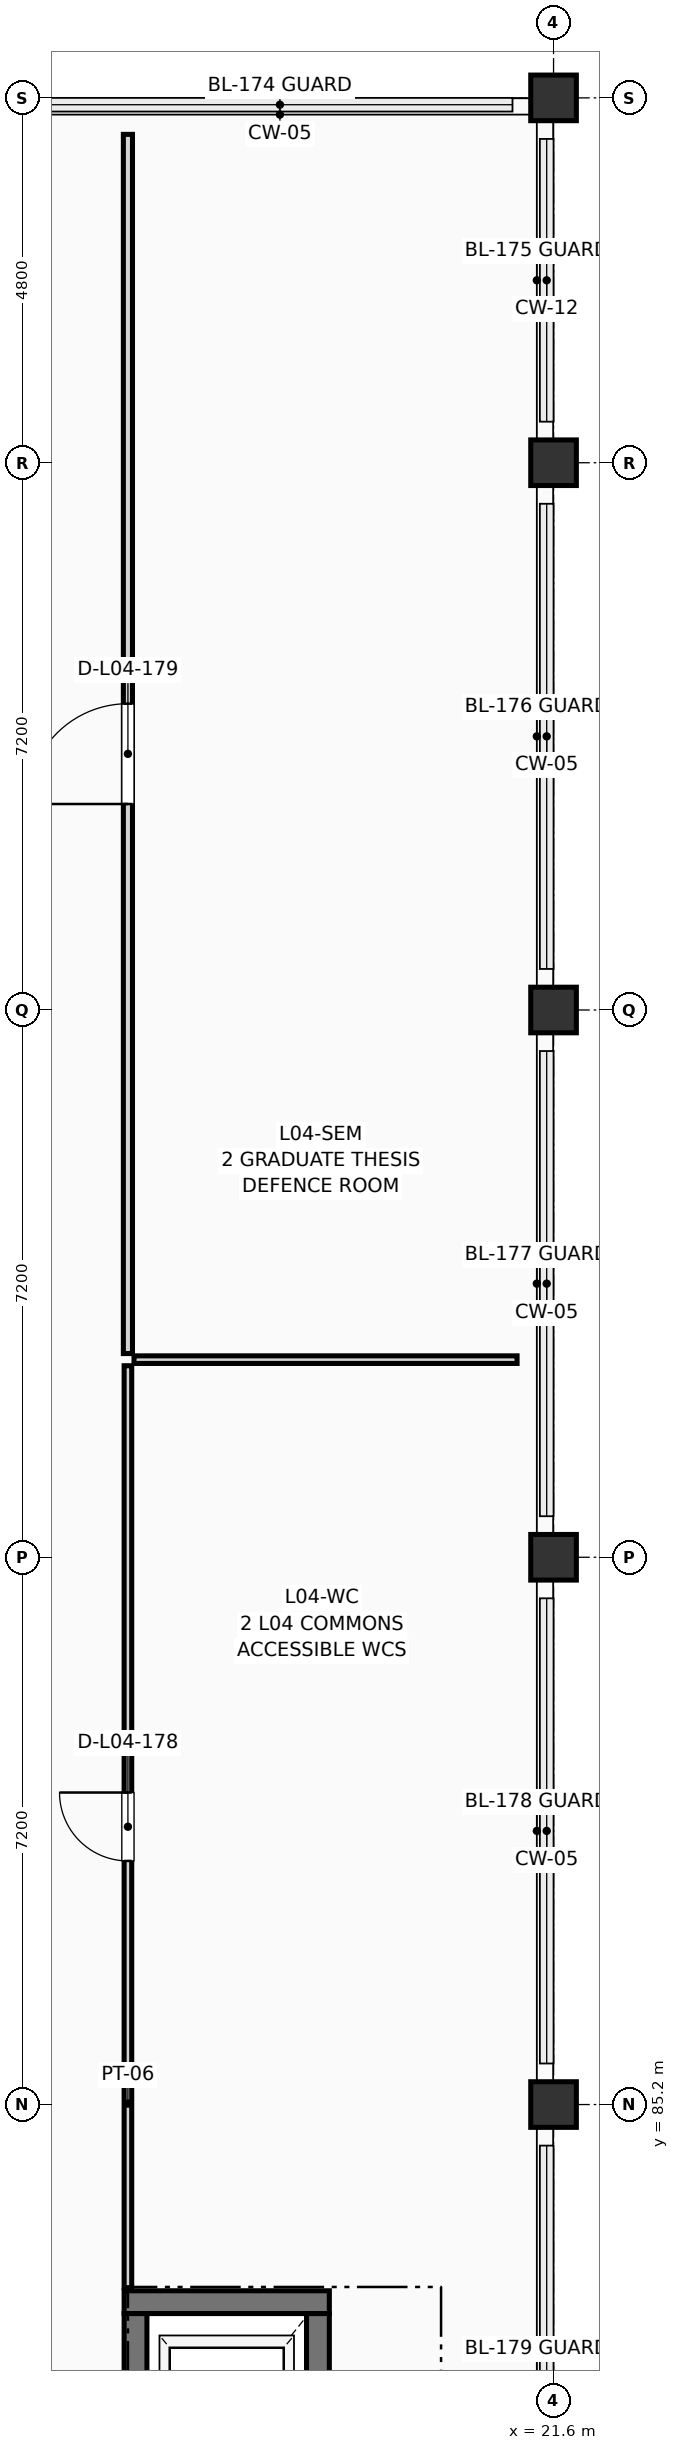
"""IFC4 building model, lengths in metres.
Left out: names, types, materials, properties, quantities, classifications, styles, units other than length and angle.
Written with IfcOpenShell. Run it as: python <this file> out.ifc"""

import sys

from ifc_helpers import new_model, si_unit, direction, frame, frame_2d, origin, origin_2d, place, context, subcontext, project, spatial, rectangle, extrude, element, fill, save


model = new_model("IFC4")
c1 = context("Model", 3, precision=1e-05, world=origin(), true_north=direction((0.0, 1.0)))
c2 = subcontext(c1, "Body", "Model", "MODEL_VIEW")
j1 = project(units=[si_unit("LENGTHUNIT", "METRE"), si_unit("PLANEANGLEUNIT", "RADIAN")], contexts=[c1])
p1 = place(None, origin())
s1 = spatial("IfcSite", under=j1, at=p1, CompositionType="ELEMENT")
p2 = place(p1, origin())
s2 = spatial("IfcBuilding", under=s1, at=p2, CompositionType="ELEMENT")
p3 = place(p2, frame((0.0, 0.0, 15.75)))
s3 = spatial("IfcBuildingStorey", under=s2, at=p3, CompositionType="ELEMENT", Elevation=15.75)
for number, where, z_axis, x_axis in (
    (1, (21.6, 85.2, 0.0), (0.0, 0.0, 1.0), (1.0, 0.0, 0.0)),
    (2, (21.6, 92.4, 0.0), (0.0, 0.0, 1.0), (1.0, 0.0, 0.0)),
    (3, (21.6, 99.6, 0.0), (0.0, 0.0, 1.0), (1.0, 0.0, 0.0)),
    (4, (21.6, 106.8, 0.0), (0.0, 0.0, 1.0), (1.0, 0.0, 0.0)),
    (5, (21.6, 111.6, 0.0), (0.0, 0.0, 1.0), (1.0, 0.0, 0.0)),
):
    element("IfcColumn", number, at=place(p3, frame(where, z_axis=z_axis, x_axis=x_axis)), inside=s3, PredefinedType="COLUMN", context=c2, shape_type="SweptSolid", body=[
        extrude(rectangle(XDim=0.6, YDim=0.6, at=origin_2d()), origin(), (0.0, 0.0, 1.0), 3.6),
    ])
p4 = place(p3, frame((15.95, 82.6, 0.0), z_axis=(0.0, 0.0, 1.0), x_axis=(1.0, 0.0, 0.0)))
e6 = element("IfcWall", 6, at=p4, inside=s3, PredefinedType="SHEAR", context=c2, shape_type="SweptSolid", body=[
    extrude(rectangle(XDim=2.7, YDim=0.3, at=frame_2d((1.35, 0.0))), origin(), (0.0, 0.0, 1.0), 3.39),
])
p5 = place(p3, frame((16.1, 79.78, 0.0), z_axis=(0.0, 0.0, 1.0), x_axis=(0.0, 1.0, 0.0)))
e7 = element("IfcWall", 7, at=p5, inside=s3, PredefinedType="SHEAR", context=c2, shape_type="SweptSolid", body=[
    extrude(rectangle(XDim=2.67, YDim=0.3, at=frame_2d((1.335, 0.0))), origin(), (0.0, 0.0, 1.0), 3.39),
])
p6 = place(p5, frame((0.785, 0.0, 0.0)))
e8 = element("IfcOpeningElement", 8, at=p6, cuts=e7, PredefinedType="OPENING", context=c2, shape_type="SweptSolid", body=[
    extrude(rectangle(XDim=1.1, YDim=2.2, at=frame_2d((0.55, 1.1))), frame((0.0, 0.162, 0.0), z_axis=(0.0, -1.0, 0.0), x_axis=(1.0, 0.0, 0.0)), (0.0, 0.0, 1.0), 0.324),
])
p7 = place(p3, frame((18.5, 79.78, 0.0), z_axis=(0.0, 0.0, 1.0), x_axis=(0.0, 1.0, 0.0)))
e9 = element("IfcWall", 9, at=p7, inside=s3, PredefinedType="SHEAR", context=c2, shape_type="SweptSolid", body=[
    extrude(rectangle(XDim=2.67, YDim=0.3, at=frame_2d((1.335, 0.0))), origin(), (0.0, 0.0, 1.0), 3.39),
])
p8 = place(p3, frame((16.0, 82.79, 0.0), z_axis=(0.0, 0.0, 1.0), x_axis=(0.0, 1.0, 0.0)))
e10 = element("IfcWall", 10, at=p8, inside=s3, PredefinedType="PARTITIONING", context=c2, shape_type="SweptSolid", body=[
    extrude(rectangle(XDim=12.13, YDim=0.1, at=frame_2d((6.065, 0.0))), origin(), (0.0, 0.0, 1.0), 3.375),
])
p9 = place(p8, frame((5.615, 0.0, 0.0)))
e11 = element("IfcOpeningElement", 11, at=p9, cuts=e10, PredefinedType="OPENING", context=c2, shape_type="SweptSolid", body=[
    extrude(rectangle(XDim=0.9, YDim=2.1, at=frame_2d((0.45, 1.05))), frame((0.0, 0.062, 0.0), z_axis=(0.0, -1.0, 0.0), x_axis=(1.0, 0.0, 0.0)), (0.0, 0.0, 1.0), 0.124),
])
p10 = place(p3, frame((16.08, 95.0, 0.0), z_axis=(0.0, 0.0, 1.0), x_axis=(1.0, 0.0, 0.0)))
e12 = element("IfcWall", 12, at=p10, inside=s3, PredefinedType="PARTITIONING", context=c2, shape_type="SweptSolid", body=[
    extrude(rectangle(XDim=5.04, YDim=0.1, at=frame_2d((2.52, 0.0))), origin(), (0.0, 0.0, 1.0), 3.375),
])
p11 = place(p3, frame((16.0, 95.08, 0.0), z_axis=(0.0, 0.0, 1.0), x_axis=(0.0, 1.0, 0.0)))
e13 = element("IfcWall", 13, at=p11, inside=s3, PredefinedType="PARTITIONING", context=c2, shape_type="SweptSolid", body=[
    extrude(rectangle(XDim=16.04, YDim=0.12, at=frame_2d((8.02, 0.0))), origin(), (0.0, 0.0, 1.0), 3.375),
])
p12 = place(p11, frame((7.23, 0.0, 0.0)))
e14 = element("IfcOpeningElement", 14, at=p12, cuts=e13, PredefinedType="OPENING", context=c2, shape_type="SweptSolid", body=[
    extrude(rectangle(XDim=1.32, YDim=2.2, at=frame_2d((0.66, 1.1))), frame((0.0, 0.072, 0.0), z_axis=(0.0, -1.0, 0.0), x_axis=(1.0, 0.0, 0.0)), (0.0, 0.0, 1.0), 0.144),
])
p13 = place(p9, origin())
e15 = element("IfcDoor", 15, at=p13, inside=s3, OperationType="SINGLE_SWING_RIGHT", PredefinedType="DOOR", context=c2, shape_type="SweptSolid", body=[
    extrude(rectangle(XDim=0.9, YDim=2.1, at=frame_2d((0.45, 1.05))), frame((0.0, 0.025, 0.0), z_axis=(0.0, -1.0, 0.0), x_axis=(1.0, 0.0, 0.0)), (0.0, 0.0, 1.0), 0.05),
])
fill(e11, e15)
p14 = place(p12, origin())
e16 = element("IfcDoor", 16, at=p14, inside=s3, OperationType="SINGLE_SWING_LEFT", PredefinedType="DOOR", context=c2, shape_type="SweptSolid", body=[
    extrude(rectangle(XDim=1.32, YDim=2.2, at=frame_2d((0.66, 1.1))), frame((0.0, 0.025, 0.0), z_axis=(0.0, -1.0, 0.0), x_axis=(1.0, 0.0, 0.0)), (0.0, 0.0, 1.0), 0.05),
])
fill(e14, e16)
save(model, sys.argv[1])
